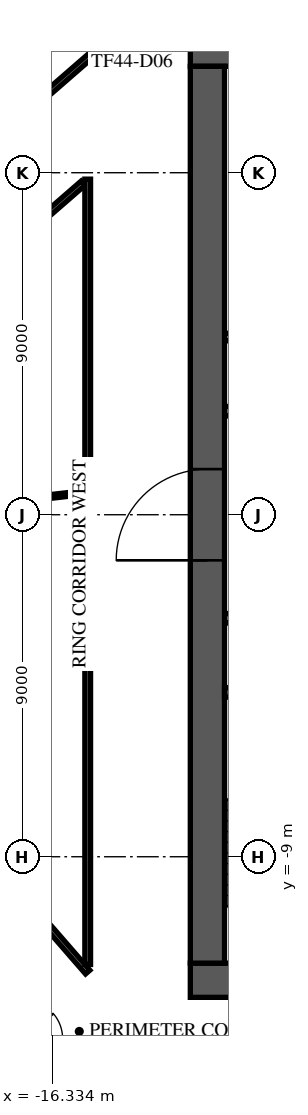
"""IFC4 building model, lengths in metres.
Left out: names, types, materials, properties, quantities, classifications, styles, units other than length and angle.
Written with IfcOpenShell. Run it as: python <this file> out.ifc"""

import sys

from ifc_helpers import new_model, si_unit, direction, frame, frame_2d, origin, place, context, subcontext, project, spatial, rectangle, extrude, element, fill, save


model = new_model("IFC4")
c1 = context("Model", 3, precision=1e-05, world=origin(), true_north=direction((0.0, 1.0)))
c2 = subcontext(c1, "Body", "Model", "MODEL_VIEW")
j1 = project(units=[si_unit("LENGTHUNIT", "METRE"), si_unit("PLANEANGLEUNIT", "RADIAN")], contexts=[c1])
p1 = place(None, origin())
s1 = spatial("IfcSite", under=j1, at=p1, CompositionType="ELEMENT")
p2 = place(p1, origin())
s2 = spatial("IfcBuilding", under=s1, at=p2, CompositionType="ELEMENT")
p3 = place(p2, frame((0.0, 0.0, 189.3)))
s3 = spatial("IfcBuildingStorey", under=s2, at=p3, CompositionType="ELEMENT", Elevation=189.3)
p4 = place(p3, frame((-12.7, 12.25, 0.0), z_axis=(0.0, 0.0, 1.0), x_axis=(1.0, 0.0, 0.0)))
e1 = element("IfcWall", 1, at=p4, inside=s3, PredefinedType="SHEAR", context=c2, shape_type="SweptSolid", body=[
    extrude(rectangle(XDim=25.4, YDim=0.9, at=frame_2d((12.7, 0.0))), origin(), (0.0, 0.0, 1.0), 3.62),
])
p5 = place(p4, frame((11.5, 0.0, 0.0)))
e2 = element("IfcOpeningElement", 2, at=p5, cuts=e1, PredefinedType="OPENING", context=c2, shape_type="SweptSolid", body=[
    extrude(rectangle(XDim=2.4, YDim=2.4, at=frame_2d((1.2, 1.2))), frame((0.0, 0.46, 0.0), z_axis=(0.0, -1.0, 0.0), x_axis=(1.0, 0.0, 0.0)), (0.0, 0.0, 1.0), 0.92),
])
p6 = place(p4, frame((22.325, 0.0, 0.0)))
e3 = element("IfcOpeningElement", 3, at=p6, cuts=e1, PredefinedType="OPENING", context=c2, shape_type="SweptSolid", body=[
    extrude(rectangle(XDim=1.2, YDim=2.1, at=frame_2d((0.6, 1.05))), frame((0.0, 0.46, 0.0), z_axis=(0.0, -1.0, 0.0), x_axis=(1.0, 0.0, 0.0)), (0.0, 0.0, 1.0), 0.92),
])
p7 = place(p4, frame((1.3, 0.0, 0.0)))
e4 = element("IfcOpeningElement", 4, at=p7, cuts=e1, PredefinedType="OPENING", context=c2, shape_type="SweptSolid", body=[
    extrude(rectangle(XDim=1.0, YDim=2.1, at=frame_2d((0.5, 1.05))), frame((0.0, 0.46, 0.0), z_axis=(0.0, -1.0, 0.0), x_axis=(1.0, 0.0, 0.0)), (0.0, 0.0, 1.0), 0.92),
])
p8 = place(p3, frame((-12.7, -12.25, 0.0), z_axis=(0.0, 0.0, 1.0), x_axis=(1.0, 0.0, 0.0)))
e5 = element("IfcWall", 5, at=p8, inside=s3, PredefinedType="SHEAR", context=c2, shape_type="SweptSolid", body=[
    extrude(rectangle(XDim=25.4, YDim=0.9, at=frame_2d((12.7, 0.0))), origin(), (0.0, 0.0, 1.0), 3.62),
])
p9 = place(p8, frame((7.6, 0.0, 0.0)))
e6 = element("IfcOpeningElement", 6, at=p9, cuts=e5, PredefinedType="OPENING", context=c2, shape_type="SweptSolid", body=[
    extrude(rectangle(XDim=2.0, YDim=2.1, at=frame_2d((1.0, 1.05))), frame((0.0, 0.46, 0.0), z_axis=(0.0, -1.0, 0.0), x_axis=(1.0, 0.0, 0.0)), (0.0, 0.0, 1.0), 0.92),
])
p10 = place(p8, frame((17.725, 0.0, 0.0)))
e7 = element("IfcOpeningElement", 7, at=p10, cuts=e5, PredefinedType="OPENING", context=c2, shape_type="SweptSolid", body=[
    extrude(rectangle(XDim=1.2, YDim=2.1, at=frame_2d((0.6, 1.05))), frame((0.0, 0.46, 0.0), z_axis=(0.0, -1.0, 0.0), x_axis=(1.0, 0.0, 0.0)), (0.0, 0.0, 1.0), 0.92),
])
p11 = place(p8, frame((1.875, 0.0, 0.0)))
e8 = element("IfcOpeningElement", 8, at=p11, cuts=e5, PredefinedType="OPENING", context=c2, shape_type="SweptSolid", body=[
    extrude(rectangle(XDim=1.2, YDim=2.1, at=frame_2d((0.6, 1.05))), frame((0.0, 0.46, 0.0), z_axis=(0.0, -1.0, 0.0), x_axis=(1.0, 0.0, 0.0)), (0.0, 0.0, 1.0), 0.92),
])
p12 = place(p8, frame((22.325, 0.0, 0.0)))
e9 = element("IfcOpeningElement", 9, at=p12, cuts=e5, PredefinedType="OPENING", context=c2, shape_type="SweptSolid", body=[
    extrude(rectangle(XDim=1.2, YDim=2.1, at=frame_2d((0.6, 1.05))), frame((0.0, 0.46, 0.0), z_axis=(0.0, -1.0, 0.0), x_axis=(1.0, 0.0, 0.0)), (0.0, 0.0, 1.0), 0.92),
])
p13 = place(p3, frame((-12.25, -11.8, 0.0), z_axis=(0.0, 0.0, 1.0), x_axis=(0.0, 1.0, 0.0)))
e10 = element("IfcWall", 10, at=p13, inside=s3, PredefinedType="SHEAR", context=c2, shape_type="SweptSolid", body=[
    extrude(rectangle(XDim=23.6, YDim=0.9, at=frame_2d((11.8, 0.0))), origin(), (0.0, 0.0, 1.0), 3.62),
])
p14 = place(p13, frame((10.6, 0.0, 0.0)))
e11 = element("IfcOpeningElement", 11, at=p14, cuts=e10, PredefinedType="OPENING", context=c2, shape_type="SweptSolid", body=[
    extrude(rectangle(XDim=2.4, YDim=2.4, at=frame_2d((1.2, 1.2))), frame((0.0, 0.46, 0.0), z_axis=(0.0, -1.0, 0.0), x_axis=(1.0, 0.0, 0.0)), (0.0, 0.0, 1.0), 0.92),
])
p15 = place(p3, frame((-8.65, -4.675, 0.0), z_axis=(0.0, 0.0, 1.0), x_axis=(-1.0, 0.0, 0.0)))
e12 = element("IfcWall", 12, at=p15, inside=s3, PredefinedType="SOLIDWALL", context=c2, shape_type="SweptSolid", body=[
    extrude(rectangle(XDim=3.15, YDim=0.25, at=frame_2d((1.575, 0.0))), origin(), (0.0, 0.0, 1.0), 3.62),
])
p16 = place(p3, frame((-11.795, -2.725, 0.0), z_axis=(0.0, 0.0, 1.0), x_axis=(1.0, 0.0, 0.0)))
e13 = element("IfcWall", 13, at=p16, inside=s3, PredefinedType="PARTITIONING", context=c2, shape_type="SweptSolid", body=[
    extrude(rectangle(XDim=8.915, YDim=0.25, at=frame_2d((4.458, 0.0))), origin(), (0.0, 0.0, 1.0), 3.62),
])
p17 = place(p16, frame((1.295, 0.0, 0.0)))
e14 = element("IfcOpeningElement", 14, at=p17, cuts=e13, PredefinedType="OPENING", context=c2, shape_type="SweptSolid", body=[
    extrude(rectangle(XDim=1.0, YDim=2.1, at=frame_2d((0.5, 1.05))), frame((0.0, 0.135, 0.0), z_axis=(0.0, -1.0, 0.0), x_axis=(1.0, 0.0, 0.0)), (0.0, 0.0, 1.0), 0.27),
])
p18 = place(p16, frame((4.42, 0.0, 0.0)))
e15 = element("IfcOpeningElement", 15, at=p18, cuts=e13, PredefinedType="OPENING", context=c2, shape_type="SweptSolid", body=[
    extrude(rectangle(XDim=1.0, YDim=2.1, at=frame_2d((0.5, 1.05))), frame((0.0, 0.135, 0.0), z_axis=(0.0, -1.0, 0.0), x_axis=(1.0, 0.0, 0.0)), (0.0, 0.0, 1.0), 0.27),
])
p19 = place(p3, frame((-11.795, 2.725, 0.0), z_axis=(0.0, 0.0, 1.0), x_axis=(1.0, 0.0, 0.0)))
e16 = element("IfcWall", 16, at=p19, inside=s3, PredefinedType="PARTITIONING", context=c2, shape_type="SweptSolid", body=[
    extrude(rectangle(XDim=3.415, YDim=0.25, at=frame_2d((1.708, 0.0))), origin(), (0.0, 0.0, 1.0), 3.62),
])
p20 = place(p19, frame((1.345, 0.0, 0.0)))
e17 = element("IfcOpeningElement", 17, at=p20, cuts=e16, PredefinedType="OPENING", context=c2, shape_type="SweptSolid", body=[
    extrude(rectangle(XDim=0.9, YDim=2.1, at=frame_2d((0.45, 1.05))), frame((0.0, 0.135, 0.0), z_axis=(0.0, -1.0, 0.0), x_axis=(1.0, 0.0, 0.0)), (0.0, 0.0, 1.0), 0.27),
])
p21 = place(p3, frame((-11.795, 4.675, 0.0), z_axis=(0.0, 0.0, 1.0), x_axis=(1.0, 0.0, 0.0)))
e18 = element("IfcWall", 18, at=p21, inside=s3, PredefinedType="PARTITIONING", context=c2, shape_type="SweptSolid", body=[
    extrude(rectangle(XDim=3.415, YDim=0.2, at=frame_2d((1.708, 0.0))), origin(), (0.0, 0.0, 1.0), 3.62),
])
p22 = place(p3, frame((2.286, 34.715, 0.0), z_axis=(0.0, 0.0, 1.0), x_axis=(-0.754708272811, -0.656060532993, 0.0)))
e19 = element("IfcWall", 19, at=p22, inside=s3, PredefinedType="STANDARD", context=c2, shape_type="SweptSolid", body=[
    extrude(rectangle(XDim=49.0, YDim=0.6, at=frame_2d((24.5, 0.0))), origin(), (0.0, 0.0, 1.0), 3.62),
])
p23 = place(p22, frame((1.227, 0.0, 0.9)))
e20 = element("IfcOpeningElement", 20, at=p23, cuts=e19, PredefinedType="OPENING", context=c2, shape_type="SweptSolid", body=[
    extrude(rectangle(XDim=2.0, YDim=2.1, at=frame_2d((1.0, 1.05))), frame((0.0, 0.31, 0.0), z_axis=(0.0, -1.0, 0.0), x_axis=(1.0, 0.0, 0.0)), (0.0, 0.0, 1.0), 0.62),
])
p24 = place(p22, frame((5.682, 0.0, 0.9)))
e21 = element("IfcOpeningElement", 21, at=p24, cuts=e19, PredefinedType="OPENING", context=c2, shape_type="SweptSolid", body=[
    extrude(rectangle(XDim=2.0, YDim=2.1, at=frame_2d((1.0, 1.05))), frame((0.0, 0.31, 0.0), z_axis=(0.0, -1.0, 0.0), x_axis=(1.0, 0.0, 0.0)), (0.0, 0.0, 1.0), 0.62),
])
p25 = place(p22, frame((10.136, 0.0, 0.9)))
e22 = element("IfcOpeningElement", 22, at=p25, cuts=e19, PredefinedType="OPENING", context=c2, shape_type="SweptSolid", body=[
    extrude(rectangle(XDim=2.0, YDim=2.1, at=frame_2d((1.0, 1.05))), frame((0.0, 0.31, 0.0), z_axis=(0.0, -1.0, 0.0), x_axis=(1.0, 0.0, 0.0)), (0.0, 0.0, 1.0), 0.62),
])
p26 = place(p22, frame((14.591, 0.0, 0.9)))
e23 = element("IfcOpeningElement", 23, at=p26, cuts=e19, PredefinedType="OPENING", context=c2, shape_type="SweptSolid", body=[
    extrude(rectangle(XDim=2.0, YDim=2.1, at=frame_2d((1.0, 1.05))), frame((0.0, 0.31, 0.0), z_axis=(0.0, -1.0, 0.0), x_axis=(1.0, 0.0, 0.0)), (0.0, 0.0, 1.0), 0.62),
])
p27 = place(p22, frame((19.045, 0.0, 0.9)))
e24 = element("IfcOpeningElement", 24, at=p27, cuts=e19, PredefinedType="OPENING", context=c2, shape_type="SweptSolid", body=[
    extrude(rectangle(XDim=2.0, YDim=2.1, at=frame_2d((1.0, 1.05))), frame((0.0, 0.31, 0.0), z_axis=(0.0, -1.0, 0.0), x_axis=(1.0, 0.0, 0.0)), (0.0, 0.0, 1.0), 0.62),
])
p28 = place(p22, frame((23.5, 0.0, 0.9)))
e25 = element("IfcOpeningElement", 25, at=p28, cuts=e19, PredefinedType="OPENING", context=c2, shape_type="SweptSolid", body=[
    extrude(rectangle(XDim=2.0, YDim=2.1, at=frame_2d((1.0, 1.05))), frame((0.0, 0.31, 0.0), z_axis=(0.0, -1.0, 0.0), x_axis=(1.0, 0.0, 0.0)), (0.0, 0.0, 1.0), 0.62),
])
p29 = place(p22, frame((27.955, 0.0, 0.9)))
e26 = element("IfcOpeningElement", 26, at=p29, cuts=e19, PredefinedType="OPENING", context=c2, shape_type="SweptSolid", body=[
    extrude(rectangle(XDim=2.0, YDim=2.1, at=frame_2d((1.0, 1.05))), frame((0.0, 0.31, 0.0), z_axis=(0.0, -1.0, 0.0), x_axis=(1.0, 0.0, 0.0)), (0.0, 0.0, 1.0), 0.62),
])
p30 = place(p22, frame((32.409, 0.0, 0.9)))
e27 = element("IfcOpeningElement", 27, at=p30, cuts=e19, PredefinedType="OPENING", context=c2, shape_type="SweptSolid", body=[
    extrude(rectangle(XDim=2.0, YDim=2.1, at=frame_2d((1.0, 1.05))), frame((0.0, 0.31, 0.0), z_axis=(0.0, -1.0, 0.0), x_axis=(1.0, 0.0, 0.0)), (0.0, 0.0, 1.0), 0.62),
])
p31 = place(p22, frame((36.864, 0.0, 0.9)))
e28 = element("IfcOpeningElement", 28, at=p31, cuts=e19, PredefinedType="OPENING", context=c2, shape_type="SweptSolid", body=[
    extrude(rectangle(XDim=2.0, YDim=2.1, at=frame_2d((1.0, 1.05))), frame((0.0, 0.31, 0.0), z_axis=(0.0, -1.0, 0.0), x_axis=(1.0, 0.0, 0.0)), (0.0, 0.0, 1.0), 0.62),
])
p32 = place(p22, frame((41.318, 0.0, 0.9)))
e29 = element("IfcOpeningElement", 29, at=p32, cuts=e19, PredefinedType="OPENING", context=c2, shape_type="SweptSolid", body=[
    extrude(rectangle(XDim=2.0, YDim=2.1, at=frame_2d((1.0, 1.05))), frame((0.0, 0.31, 0.0), z_axis=(0.0, -1.0, 0.0), x_axis=(1.0, 0.0, 0.0)), (0.0, 0.0, 1.0), 0.62),
])
p33 = place(p22, frame((45.773, 0.0, 0.9)))
e30 = element("IfcOpeningElement", 30, at=p33, cuts=e19, PredefinedType="OPENING", context=c2, shape_type="SweptSolid", body=[
    extrude(rectangle(XDim=2.0, YDim=2.1, at=frame_2d((1.0, 1.05))), frame((0.0, 0.31, 0.0), z_axis=(0.0, -1.0, 0.0), x_axis=(1.0, 0.0, 0.0)), (0.0, 0.0, 1.0), 0.62),
])
p34 = place(p3, frame((-35.208, -4.768, 0.0), z_axis=(0.0, 0.0, 1.0), x_axis=(0.656058749455, -0.754709823219, 0.0)))
e31 = element("IfcWall", 31, at=p34, inside=s3, PredefinedType="STANDARD", context=c2, shape_type="SweptSolid", body=[
    extrude(rectangle(XDim=39.0, YDim=0.6, at=frame_2d((19.5, 0.0))), origin(), (0.0, 0.0, 1.0), 3.62),
])
p35 = place(p34, frame((1.217, 0.0, 0.9)))
e32 = element("IfcOpeningElement", 32, at=p35, cuts=e31, PredefinedType="OPENING", context=c2, shape_type="SweptSolid", body=[
    extrude(rectangle(XDim=1.9, YDim=2.1, at=frame_2d((0.95, 1.05))), frame((0.0, 0.31, 0.0), z_axis=(0.0, -1.0, 0.0), x_axis=(1.0, 0.0, 0.0)), (0.0, 0.0, 1.0), 0.62),
])
p36 = place(p34, frame((5.55, 0.0, 0.9)))
e33 = element("IfcOpeningElement", 33, at=p36, cuts=e31, PredefinedType="OPENING", context=c2, shape_type="SweptSolid", body=[
    extrude(rectangle(XDim=1.9, YDim=2.1, at=frame_2d((0.95, 1.05))), frame((0.0, 0.31, 0.0), z_axis=(0.0, -1.0, 0.0), x_axis=(1.0, 0.0, 0.0)), (0.0, 0.0, 1.0), 0.62),
])
p37 = place(p34, frame((9.883, 0.0, 0.9)))
e34 = element("IfcOpeningElement", 34, at=p37, cuts=e31, PredefinedType="OPENING", context=c2, shape_type="SweptSolid", body=[
    extrude(rectangle(XDim=1.9, YDim=2.1, at=frame_2d((0.95, 1.05))), frame((0.0, 0.31, 0.0), z_axis=(0.0, -1.0, 0.0), x_axis=(1.0, 0.0, 0.0)), (0.0, 0.0, 1.0), 0.62),
])
p38 = place(p34, frame((14.217, 0.0, 0.9)))
e35 = element("IfcOpeningElement", 35, at=p38, cuts=e31, PredefinedType="OPENING", context=c2, shape_type="SweptSolid", body=[
    extrude(rectangle(XDim=1.9, YDim=2.1, at=frame_2d((0.95, 1.05))), frame((0.0, 0.31, 0.0), z_axis=(0.0, -1.0, 0.0), x_axis=(1.0, 0.0, 0.0)), (0.0, 0.0, 1.0), 0.62),
])
p39 = place(p34, frame((18.55, 0.0, 0.9)))
e36 = element("IfcOpeningElement", 36, at=p39, cuts=e31, PredefinedType="OPENING", context=c2, shape_type="SweptSolid", body=[
    extrude(rectangle(XDim=1.9, YDim=2.1, at=frame_2d((0.95, 1.05))), frame((0.0, 0.31, 0.0), z_axis=(0.0, -1.0, 0.0), x_axis=(1.0, 0.0, 0.0)), (0.0, 0.0, 1.0), 0.62),
])
p40 = place(p34, frame((22.883, 0.0, 0.9)))
e37 = element("IfcOpeningElement", 37, at=p40, cuts=e31, PredefinedType="OPENING", context=c2, shape_type="SweptSolid", body=[
    extrude(rectangle(XDim=1.9, YDim=2.1, at=frame_2d((0.95, 1.05))), frame((0.0, 0.31, 0.0), z_axis=(0.0, -1.0, 0.0), x_axis=(1.0, 0.0, 0.0)), (0.0, 0.0, 1.0), 0.62),
])
p41 = place(p34, frame((27.217, 0.0, 0.9)))
e38 = element("IfcOpeningElement", 38, at=p41, cuts=e31, PredefinedType="OPENING", context=c2, shape_type="SweptSolid", body=[
    extrude(rectangle(XDim=1.9, YDim=2.1, at=frame_2d((0.95, 1.05))), frame((0.0, 0.31, 0.0), z_axis=(0.0, -1.0, 0.0), x_axis=(1.0, 0.0, 0.0)), (0.0, 0.0, 1.0), 0.62),
])
p42 = place(p34, frame((31.55, 0.0, 0.9)))
e39 = element("IfcOpeningElement", 39, at=p42, cuts=e31, PredefinedType="OPENING", context=c2, shape_type="SweptSolid", body=[
    extrude(rectangle(XDim=1.9, YDim=2.1, at=frame_2d((0.95, 1.05))), frame((0.0, 0.31, 0.0), z_axis=(0.0, -1.0, 0.0), x_axis=(1.0, 0.0, 0.0)), (0.0, 0.0, 1.0), 0.62),
])
p43 = place(p34, frame((35.883, 0.0, 0.9)))
e40 = element("IfcOpeningElement", 40, at=p43, cuts=e31, PredefinedType="OPENING", context=c2, shape_type="SweptSolid", body=[
    extrude(rectangle(XDim=1.9, YDim=2.1, at=frame_2d((0.95, 1.05))), frame((0.0, 0.31, 0.0), z_axis=(0.0, -1.0, 0.0), x_axis=(1.0, 0.0, 0.0)), (0.0, 0.0, 1.0), 0.62),
])
p44 = place(p3, frame((-26.208, 2.616, 0.0), z_axis=(0.0, 0.0, 1.0), x_axis=(0.754710701231, 0.656057739416, 0.0)))
e41 = element("IfcWall", 41, at=p44, inside=s3, PredefinedType="PARTITIONING", context=c2, shape_type="SweptSolid", body=[
    extrude(rectangle(XDim=36.126, YDim=0.15, at=frame_2d((18.063, 0.0))), origin(), (0.0, 0.0, 1.0), 3.17),
])
p45 = place(p44, frame((2.551, 0.0, 0.0)))
e42 = element("IfcOpeningElement", 42, at=p45, cuts=e41, PredefinedType="OPENING", context=c2, shape_type="SweptSolid", body=[
    extrude(rectangle(XDim=1.0, YDim=2.1, at=frame_2d((0.5, 1.05))), frame((0.0, 0.085, 0.0), z_axis=(0.0, -1.0, 0.0), x_axis=(1.0, 0.0, 0.0)), (0.0, 0.0, 1.0), 0.17),
])
p46 = place(p44, frame((15.362, 0.0, 0.0)))
e43 = element("IfcOpeningElement", 43, at=p46, cuts=e41, PredefinedType="OPENING", context=c2, shape_type="SweptSolid", body=[
    extrude(rectangle(XDim=1.0, YDim=2.1, at=frame_2d((0.5, 1.05))), frame((0.0, 0.085, 0.0), z_axis=(0.0, -1.0, 0.0), x_axis=(1.0, 0.0, 0.0)), (0.0, 0.0, 1.0), 0.17),
])
p47 = place(p44, frame((25.542, 0.0, 0.0)))
e44 = element("IfcOpeningElement", 44, at=p47, cuts=e41, PredefinedType="OPENING", context=c2, shape_type="SweptSolid", body=[
    extrude(rectangle(XDim=1.8, YDim=2.1, at=frame_2d((0.9, 1.05))), frame((0.0, 0.085, 0.0), z_axis=(0.0, -1.0, 0.0), x_axis=(1.0, 0.0, 0.0)), (0.0, 0.0, 1.0), 0.17),
])
p48 = place(p3, frame((-24.98, -4.673, 0.0), z_axis=(0.0, 0.0, 1.0), x_axis=(0.656048444225, -0.754718781289, 0.0)))
e45 = element("IfcWall", 45, at=p48, inside=s3, PredefinedType="PARTITIONING", context=c2, shape_type="SweptSolid", body=[
    extrude(rectangle(XDim=25.8, YDim=0.15, at=frame_2d((12.9, 0.0))), origin(), (0.0, 0.0, 1.0), 3.17),
])
p49 = place(p48, frame((12.071, 0.0, 0.0)))
e46 = element("IfcOpeningElement", 46, at=p49, cuts=e45, PredefinedType="OPENING", context=c2, shape_type="SweptSolid", body=[
    extrude(rectangle(XDim=1.0, YDim=2.1, at=frame_2d((0.5, 1.05))), frame((0.0, 0.085, 0.0), z_axis=(0.0, -1.0, 0.0), x_axis=(1.0, 0.0, 0.0)), (0.0, 0.0, 1.0), 0.17),
])
p50 = place(p48, frame((24.318, 0.0, 0.0)))
e47 = element("IfcOpeningElement", 47, at=p50, cuts=e45, PredefinedType="OPENING", context=c2, shape_type="SweptSolid", body=[
    extrude(rectangle(XDim=1.0, YDim=2.1, at=frame_2d((0.5, 1.05))), frame((0.0, 0.085, 0.0), z_axis=(0.0, -1.0, 0.0), x_axis=(1.0, 0.0, 0.0)), (0.0, 0.0, 1.0), 0.17),
])
p51 = place(p3, frame((-24.576, 0.854, 0.0), z_axis=(0.0, 0.0, 1.0), x_axis=(0.75472382762, 0.656042638875, 0.0)))
e48 = element("IfcWall", 48, at=p51, inside=s3, PredefinedType="PARTITIONING", context=c2, shape_type="SweptSolid", body=[
    extrude(rectangle(XDim=11.994, YDim=0.15, at=frame_2d((5.997, 0.0))), origin(), (0.0, 0.0, 1.0), 3.17),
])
p52 = place(p51, frame((6.8, 0.0, 0.0)))
e49 = element("IfcOpeningElement", 49, at=p52, cuts=e48, PredefinedType="OPENING", context=c2, shape_type="SweptSolid", body=[
    extrude(rectangle(XDim=1.8, YDim=2.1, at=frame_2d((0.9, 1.05))), frame((0.0, 0.085, 0.0), z_axis=(0.0, -1.0, 0.0), x_axis=(1.0, 0.0, 0.0)), (0.0, 0.0, 1.0), 0.17),
])
p53 = place(p3, frame((-23.169, -3.098, 0.0), z_axis=(0.0, 0.0, 1.0), x_axis=(0.656047525283, -0.754719580089, 0.0)))
e50 = element("IfcWall", 50, at=p53, inside=s3, PredefinedType="PARTITIONING", context=c2, shape_type="SweptSolid", body=[
    extrude(rectangle(XDim=11.842, YDim=0.15, at=frame_2d((5.921, 0.0))), origin(), (0.0, 0.0, 1.0), 3.17),
])
p54 = place(p53, frame((2.8, 0.0, 0.0)))
e51 = element("IfcOpeningElement", 51, at=p54, cuts=e50, PredefinedType="OPENING", context=c2, shape_type="SweptSolid", body=[
    extrude(rectangle(XDim=1.8, YDim=2.1, at=frame_2d((0.9, 1.05))), frame((0.0, 0.085, 0.0), z_axis=(0.0, -1.0, 0.0), x_axis=(1.0, 0.0, 0.0)), (0.0, 0.0, 1.0), 0.17),
])
p55 = place(p53, frame((7.55, 0.0, 0.0)))
e52 = element("IfcOpeningElement", 52, at=p55, cuts=e50, PredefinedType="OPENING", context=c2, shape_type="SweptSolid", body=[
    extrude(rectangle(XDim=1.0, YDim=2.1, at=frame_2d((0.5, 1.05))), frame((0.0, 0.085, 0.0), z_axis=(0.0, -1.0, 0.0), x_axis=(1.0, 0.0, 0.0)), (0.0, 0.0, 1.0), 0.17),
])
p56 = place(p3, frame((-15.4, -11.834, 0.0), z_axis=(0.0, 0.0, 1.0), x_axis=(0.0, 1.0, 0.0)))
e53 = element("IfcWall", 53, at=p56, inside=s3, PredefinedType="PARTITIONING", context=c2, shape_type="SweptSolid", body=[
    extrude(rectangle(XDim=20.666, YDim=0.15, at=frame_2d((10.333, 0.0))), origin(), (0.0, 0.0, 1.0), 3.17),
])
p57 = place(p3, frame((-31.316, -1.242, 0.0), z_axis=(0.0, 0.0, 1.0), x_axis=(0.993421473136, 0.114515399452, 0.0)))
e54 = element("IfcWall", 54, at=p57, inside=s3, PredefinedType="PARTITIONING", context=c2, shape_type="SweptSolid", body=[
    extrude(rectangle(XDim=15.941, YDim=0.1, at=frame_2d((7.97, 0.0))), origin(), (0.0, 0.0, 1.0), 3.17),
])
p58 = place(p14, origin())
e55 = element("IfcDoor", 55, at=p58, inside=s3, OperationType="SINGLE_SWING_LEFT", PredefinedType="DOOR", context=c2, shape_type="SweptSolid", body=[
    extrude(rectangle(XDim=2.4, YDim=2.4, at=frame_2d((1.2, 1.2))), frame((0.0, 0.025, 0.0), z_axis=(0.0, -1.0, 0.0), x_axis=(1.0, 0.0, 0.0)), (0.0, 0.0, 1.0), 0.05),
])
fill(e11, e55)
save(model, sys.argv[1])
